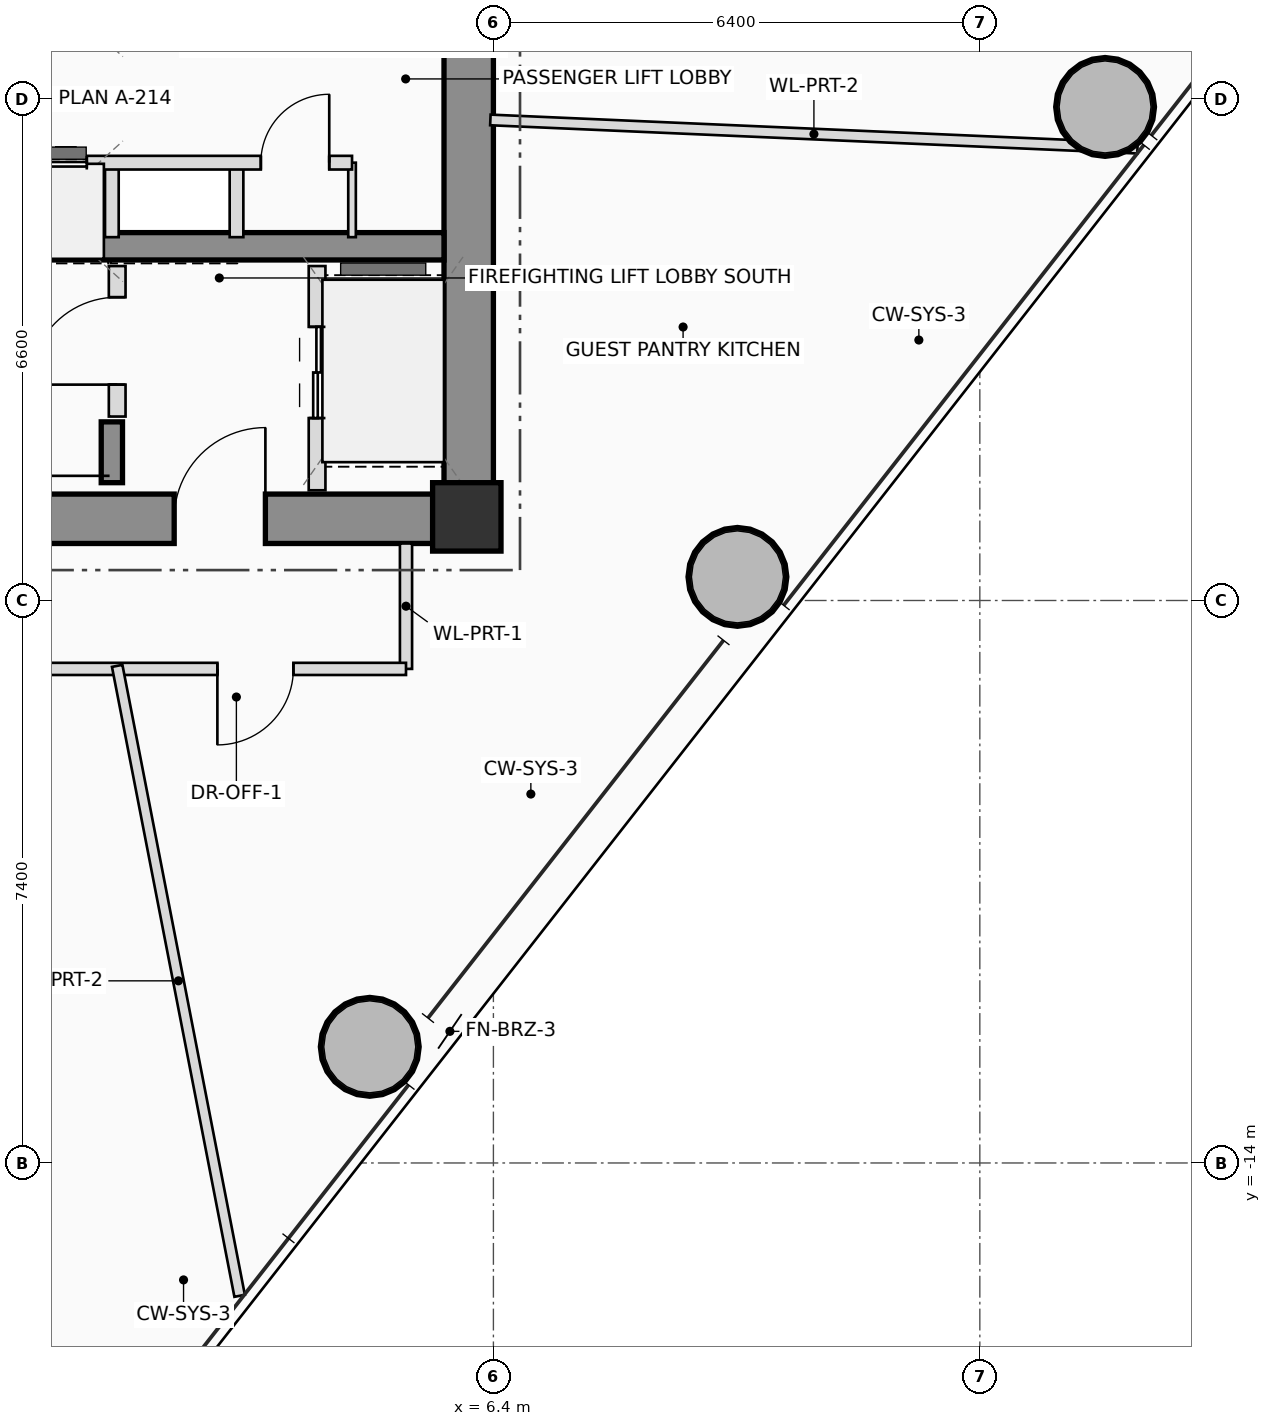
"""IFC4 building model, lengths in metres.
Left out: names, types, materials, properties, quantities, classifications, styles, units other than length and angle.
Written with IfcOpenShell. Run it as: python <this file> out.ifc"""

import sys

from ifc_helpers import new_model, si_unit, direction, frame, frame_2d, origin, origin_2d, place, context, subcontext, project, spatial, rectangle, hollow_circle, extrude, source, transform, mapped, element, fill, save


model = new_model("IFC4")
c1 = context("Model", 3, precision=1e-05, world=origin(), true_north=direction((0.0, 1.0)))
c2 = subcontext(c1, "Body", "Model", "MODEL_VIEW")
j1 = project(units=[si_unit("LENGTHUNIT", "METRE"), si_unit("PLANEANGLEUNIT", "RADIAN")], contexts=[c1])
p1 = place(None, origin())
s1 = spatial("IfcSite", under=j1, at=p1, CompositionType="ELEMENT")
p2 = place(p1, origin())
s2 = spatial("IfcBuilding", under=s1, at=p2, CompositionType="ELEMENT")
p3 = place(p2, frame((0.0, 0.0, 146.75)))
s3 = spatial("IfcBuildingStorey", under=s2, at=p3, CompositionType="ELEMENT", Elevation=146.75)
m1 = source(origin(), c2, "Body", "SweptSolid", [
    extrude(rectangle(XDim=0.9, YDim=0.9, at=origin_2d()), origin(), (0.0, 0.0, 1.0), 3.45),
])
p4 = place(p3, frame((6.05, -5.5, 0.0), z_axis=(0.0, 0.0, 1.0), x_axis=(1.0, 0.0, 0.0)))
e1 = element("IfcColumn", 1, at=p4, inside=s3, PredefinedType="COLUMN", context=c2, shape_type="MappedRepresentation", body=[
    mapped(m1, transform((0.0, 0.0, 0.0), scale=1.0)),
])
p5 = place(p3, frame((-6.4, -5.525, 0.0), z_axis=(0.0, 0.0, 1.0), x_axis=(1.0, 0.0, 0.0)))
e2 = element("IfcWall", 2, at=p5, inside=s3, PredefinedType="SHEAR", context=c2, shape_type="SweptSolid", body=[
    extrude(rectangle(XDim=12.8, YDim=0.65, at=frame_2d((6.4, 0.0))), origin(), (0.0, 0.0, 1.0), 3.45),
])
p6 = place(p5, frame((8.6, 0.0, 0.0)))
e3 = element("IfcOpeningElement", 3, at=p6, cuts=e2, PredefinedType="OPENING", context=c2, shape_type="SweptSolid", body=[
    extrude(rectangle(XDim=1.2, YDim=2.2, at=frame_2d((0.6, 1.1))), frame((0.0, 0.335, 0.0), z_axis=(0.0, -1.0, 0.0), x_axis=(1.0, 0.0, 0.0)), (0.0, 0.0, 1.0), 0.67),
])
p7 = place(p3, frame((6.075, -5.2, 0.0), z_axis=(0.0, 0.0, 1.0), x_axis=(0.0, 1.0, 0.0)))
e4 = element("IfcWall", 4, at=p7, inside=s3, PredefinedType="SHEAR", context=c2, shape_type="SweptSolid", body=[
    extrude(rectangle(XDim=10.4, YDim=0.65, at=frame_2d((5.2, 0.0))), origin(), (0.0, 0.0, 1.0), 3.45),
])
p8 = place(p3, frame((-5.75, -1.94, 0.0), z_axis=(0.0, 0.0, 1.0), x_axis=(1.0, 0.0, 0.0)))
e5 = element("IfcWall", 5, at=p8, inside=s3, PredefinedType="SHEAR", context=c2, shape_type="SweptSolid", body=[
    extrude(rectangle(XDim=11.5, YDim=0.36, at=frame_2d((5.75, 0.0))), origin(), (0.0, 0.0, 1.0), 3.45),
])
p9 = place(p3, frame((1.38, -5.05, 0.0), z_axis=(0.0, 0.0, 1.0), x_axis=(0.0, 1.0, 0.0)))
e6 = element("IfcWall", 6, at=p9, inside=s3, PredefinedType="SHEAR", context=c2, shape_type="SweptSolid", body=[
    extrude(rectangle(XDim=0.8, YDim=0.28, at=frame_2d((0.4, 0.0))), origin(), (0.0, 0.0, 1.0), 3.45),
])
m2 = source(origin(), c2, "Body", "SweptSolid", [
    extrude(hollow_circle(Radius=0.65, WallThickness=0.045, at=origin_2d()), origin(), (0.0, 0.0, 1.0), 3.45),
])
for number, where, z_axis, x_axis in (
    (7, (4.773, -12.472, 0.0), (0.0, 0.0, 1.0), (1.0, 0.0, 0.0)),
    (8, (9.611, -6.289, 0.0), (0.0, 0.0, 1.0), (1.0, 0.0, 0.0)),
    (9, (14.448, -0.107, 0.0), (0.0, 0.0, 1.0), (1.0, 0.0, 0.0)),
):
    element("IfcColumn", number, at=place(p3, frame(where, z_axis=z_axis, x_axis=x_axis)), inside=s3, PredefinedType="COLUMN", context=c2, shape_type="MappedRepresentation", body=[
        mapped(m2, transform((0.0, 0.0, 0.0), scale=1.0)),
    ])
p10 = place(p3, frame((1.45, -4.18, 0.0), z_axis=(0.0, 0.0, 1.0), x_axis=(0.0, 1.0, 0.0)))
e10 = element("IfcWall", 10, at=p10, inside=s3, PredefinedType="PLUMBINGWALL", context=c2, shape_type="SweptSolid", body=[
    extrude(rectangle(XDim=1.98, YDim=0.22, at=frame_2d((0.99, 0.0))), origin(), (0.0, 0.0, 1.0), 3.25),
])
p11 = place(p10, frame((0.42, 0.0, 0.0)))
e11 = element("IfcOpeningElement", 11, at=p11, cuts=e10, PredefinedType="OPENING", context=c2, shape_type="SweptSolid", body=[
    extrude(rectangle(XDim=1.15, YDim=2.15, at=frame_2d((0.575, 1.075))), frame((0.0, 0.12, 0.0), z_axis=(0.0, -1.0, 0.0), x_axis=(1.0, 0.0, 0.0)), (0.0, 0.0, 1.0), 0.24),
])
p12 = place(p3, frame((4.08, -5.15, 0.0), z_axis=(0.0, 0.0, 1.0), x_axis=(0.0, 1.0, 0.0)))
e12 = element("IfcWall", 12, at=p12, inside=s3, PredefinedType="PLUMBINGWALL", context=c2, shape_type="SweptSolid", body=[
    extrude(rectangle(XDim=2.95, YDim=0.22, at=frame_2d((1.475, 0.0))), origin(), (0.0, 0.0, 1.0), 3.25),
])
p13 = place(p12, frame((0.95, 0.0, 0.0)))
e13 = element("IfcOpeningElement", 13, at=p13, cuts=e12, PredefinedType="OPENING", context=c2, shape_type="SweptSolid", body=[
    extrude(rectangle(XDim=1.2, YDim=2.25, at=frame_2d((0.6, 1.125))), frame((0.0, 0.12, 0.0), z_axis=(0.0, -1.0, 0.0), x_axis=(1.0, 0.0, 0.0)), (0.0, 0.0, 1.0), 0.24),
])
for number, where, z_axis, x_axis in (
    (14, (1.38, -1.82, 0.0), (0.0, 0.0, 1.0), (0.0, 1.0, 0.0)),
    (15, (3.02, -1.82, 0.0), (0.0, 0.0, 1.0), (0.0, 1.0, 0.0)),
):
    element("IfcWall", number, at=place(p3, frame(where, z_axis=z_axis, x_axis=x_axis)), inside=s3, PredefinedType="PLUMBINGWALL", context=c2, shape_type="SweptSolid", body=[
        extrude(rectangle(XDim=0.98, YDim=0.18, at=frame_2d((0.49, 0.0))), origin(), (0.0, 0.0, 1.0), 3.25),
    ])
p14 = place(p3, frame((4.54, -1.82, 0.0), z_axis=(0.0, 0.0, 1.0), x_axis=(0.0, 1.0, 0.0)))
e16 = element("IfcWall", 16, at=p14, inside=s3, PredefinedType="PARTITIONING", context=c2, shape_type="SweptSolid", body=[
    extrude(rectangle(XDim=0.98, YDim=0.1, at=frame_2d((0.49, 0.0))), origin(), (0.0, 0.0, 1.0), 3.25),
])
p15 = place(p3, frame((-5.68, -0.84, 0.0), z_axis=(0.0, 0.0, 1.0), x_axis=(1.0, 0.0, 0.0)))
e17 = element("IfcWall", 17, at=p15, inside=s3, PredefinedType="PLUMBINGWALL", context=c2, shape_type="SweptSolid", body=[
    extrude(rectangle(XDim=10.22, YDim=0.18, at=frame_2d((5.11, 0.0))), origin(), (0.0, 0.0, 1.0), 3.25),
])
p16 = place(p15, frame((1.38, 0.0, 0.0)))
e18 = element("IfcOpeningElement", 18, at=p16, cuts=e17, PredefinedType="OPENING", context=c2, shape_type="SweptSolid", body=[
    extrude(rectangle(XDim=0.9, YDim=2.05, at=frame_2d((0.45, 1.025))), frame((0.0, 0.1, 0.0), z_axis=(0.0, -1.0, 0.0), x_axis=(1.0, 0.0, 0.0)), (0.0, 0.0, 1.0), 0.2),
])
p17 = place(p15, frame((3.93, 0.0, 0.0)))
e19 = element("IfcOpeningElement", 19, at=p17, cuts=e17, PredefinedType="OPENING", context=c2, shape_type="SweptSolid", body=[
    extrude(rectangle(XDim=1.1, YDim=2.2, at=frame_2d((0.55, 1.1))), frame((0.0, 0.1, 0.0), z_axis=(0.0, -1.0, 0.0), x_axis=(1.0, 0.0, 0.0)), (0.0, 0.0, 1.0), 0.2),
])
p18 = place(p15, frame((5.63, 0.0, 0.0)))
e20 = element("IfcOpeningElement", 20, at=p18, cuts=e17, PredefinedType="OPENING", context=c2, shape_type="SweptSolid", body=[
    extrude(rectangle(XDim=1.1, YDim=2.2, at=frame_2d((0.55, 1.1))), frame((0.0, 0.1, 0.0), z_axis=(0.0, -1.0, 0.0), x_axis=(1.0, 0.0, 0.0)), (0.0, 0.0, 1.0), 0.2),
])
p19 = place(p15, frame((9.02, 0.0, 0.0)))
e21 = element("IfcOpeningElement", 21, at=p19, cuts=e17, PredefinedType="OPENING", context=c2, shape_type="SweptSolid", body=[
    extrude(rectangle(XDim=0.9, YDim=2.05, at=frame_2d((0.45, 1.025))), frame((0.0, 0.1, 0.0), z_axis=(0.0, -1.0, 0.0), x_axis=(1.0, 0.0, 0.0)), (0.0, 0.0, 1.0), 0.2),
])
p20 = place(p3, frame((5.25, -5.85, 0.0), z_axis=(0.0, 0.0, 1.0), x_axis=(0.0, -1.0, 0.0)))
e22 = element("IfcWall", 22, at=p20, inside=s3, PredefinedType="PARTITIONING", context=c2, shape_type="SweptSolid", body=[
    extrude(rectangle(XDim=1.65, YDim=0.16, at=frame_2d((0.825, 0.0))), origin(), (0.0, 0.0, 1.0), 3.25),
])
p21 = place(p3, frame((5.25, -7.5, 0.0), z_axis=(0.0, 0.0, 1.0), x_axis=(-1.0, 0.0, 0.0)))
e23 = element("IfcWall", 23, at=p21, inside=s3, PredefinedType="PARTITIONING", context=c2, shape_type="SweptSolid", body=[
    extrude(rectangle(XDim=11.61, YDim=0.16, at=frame_2d((5.805, 0.0))), origin(), (0.0, 0.0, 1.0), 2.605),
])
p22 = place(p21, frame((1.482, 0.0, 0.0)))
e24 = element("IfcOpeningElement", 24, at=p22, cuts=e23, PredefinedType="OPENING", context=c2, shape_type="SweptSolid", body=[
    extrude(rectangle(XDim=1.0, YDim=2.25, at=frame_2d((0.5, 1.125))), frame((0.0, 0.09, 0.0), z_axis=(0.0, -1.0, 0.0), x_axis=(1.0, 0.0, 0.0)), (0.0, 0.0, 1.0), 0.18),
])
p23 = place(p3, frame((6.36, -0.278, 0.0), z_axis=(0.0, 0.0, 1.0), x_axis=(0.999047707238, -0.043631166178, 0.0)))
e25 = element("IfcWall", 25, at=p23, inside=s3, PredefinedType="PARTITIONING", context=c2, shape_type="SweptSolid", body=[
    extrude(rectangle(XDim=8.522, YDim=0.14, at=frame_2d((4.261, 0.0))), origin(), (0.0, 0.0, 1.0), 2.605),
])
p24 = place(p3, frame((1.45, -7.46, 0.0), z_axis=(0.0, 0.0, 1.0), x_axis=(0.190791487028, -0.981630586564, 0.0)))
e26 = element("IfcWall", 26, at=p24, inside=s3, PredefinedType="PARTITIONING", context=c2, shape_type="SweptSolid", body=[
    extrude(rectangle(XDim=8.443, YDim=0.14, at=frame_2d((4.221, 0.0))), origin(), (0.0, 0.0, 1.0), 2.765),
])
p25 = place(p6, origin())
e27 = element("IfcDoor", 27, at=p25, inside=s3, OperationType="SINGLE_SWING_RIGHT", PredefinedType="DOOR", context=c2, shape_type="SweptSolid", body=[
    extrude(rectangle(XDim=1.2, YDim=2.2, at=frame_2d((0.6, 1.1))), frame((0.0, 0.025, 0.0), z_axis=(0.0, -1.0, 0.0), x_axis=(1.0, 0.0, 0.0)), (0.0, 0.0, 1.0), 0.05),
])
fill(e3, e27)
p26 = place(p11, origin())
e28 = element("IfcDoor", 28, at=p26, inside=s3, OperationType="SINGLE_SWING_LEFT", PredefinedType="DOOR", context=c2, shape_type="SweptSolid", body=[
    extrude(rectangle(XDim=1.15, YDim=2.15, at=frame_2d((0.575, 1.075))), frame((0.0, 0.025, 0.0), z_axis=(0.0, -1.0, 0.0), x_axis=(1.0, 0.0, 0.0)), (0.0, 0.0, 1.0), 0.05),
])
fill(e11, e28)
p27 = place(p13, origin())
e29 = element("IfcDoor", 29, at=p27, inside=s3, OperationType="DOUBLE_DOOR_SLIDING", PredefinedType="DOOR", context=c2, shape_type="SweptSolid", body=[
    extrude(rectangle(XDim=1.2, YDim=2.25, at=frame_2d((0.6, 1.125))), frame((0.0, 0.025, 0.0), z_axis=(0.0, -1.0, 0.0), x_axis=(1.0, 0.0, 0.0)), (0.0, 0.0, 1.0), 0.05),
])
fill(e13, e29)
p28 = place(p18, origin())
e30 = element("IfcDoor", 30, at=p28, inside=s3, OperationType="DOUBLE_DOOR_SLIDING", PredefinedType="DOOR", context=c2, shape_type="SweptSolid", body=[
    extrude(rectangle(XDim=1.1, YDim=2.2, at=frame_2d((0.55, 1.1))), frame((0.0, 0.025, 0.0), z_axis=(0.0, -1.0, 0.0), x_axis=(1.0, 0.0, 0.0)), (0.0, 0.0, 1.0), 0.05),
])
fill(e20, e30)
p29 = place(p19, origin())
e31 = element("IfcDoor", 31, at=p29, inside=s3, OperationType="SINGLE_SWING_RIGHT", PredefinedType="DOOR", context=c2, shape_type="SweptSolid", body=[
    extrude(rectangle(XDim=0.9, YDim=2.05, at=frame_2d((0.45, 1.025))), frame((0.0, 0.025, 0.0), z_axis=(0.0, -1.0, 0.0), x_axis=(1.0, 0.0, 0.0)), (0.0, 0.0, 1.0), 0.05),
])
fill(e21, e31)
p30 = place(p22, origin())
e32 = element("IfcDoor", 32, at=p30, inside=s3, OperationType="SINGLE_SWING_RIGHT", PredefinedType="DOOR", context=c2, shape_type="SweptSolid", body=[
    extrude(rectangle(XDim=1.0, YDim=2.25, at=frame_2d((0.5, 1.125))), frame((0.0, 0.025, 0.0), z_axis=(0.0, -1.0, 0.0), x_axis=(1.0, 0.0, 0.0)), (0.0, 0.0, 1.0), 0.05),
])
fill(e24, e32)
save(model, sys.argv[1])
